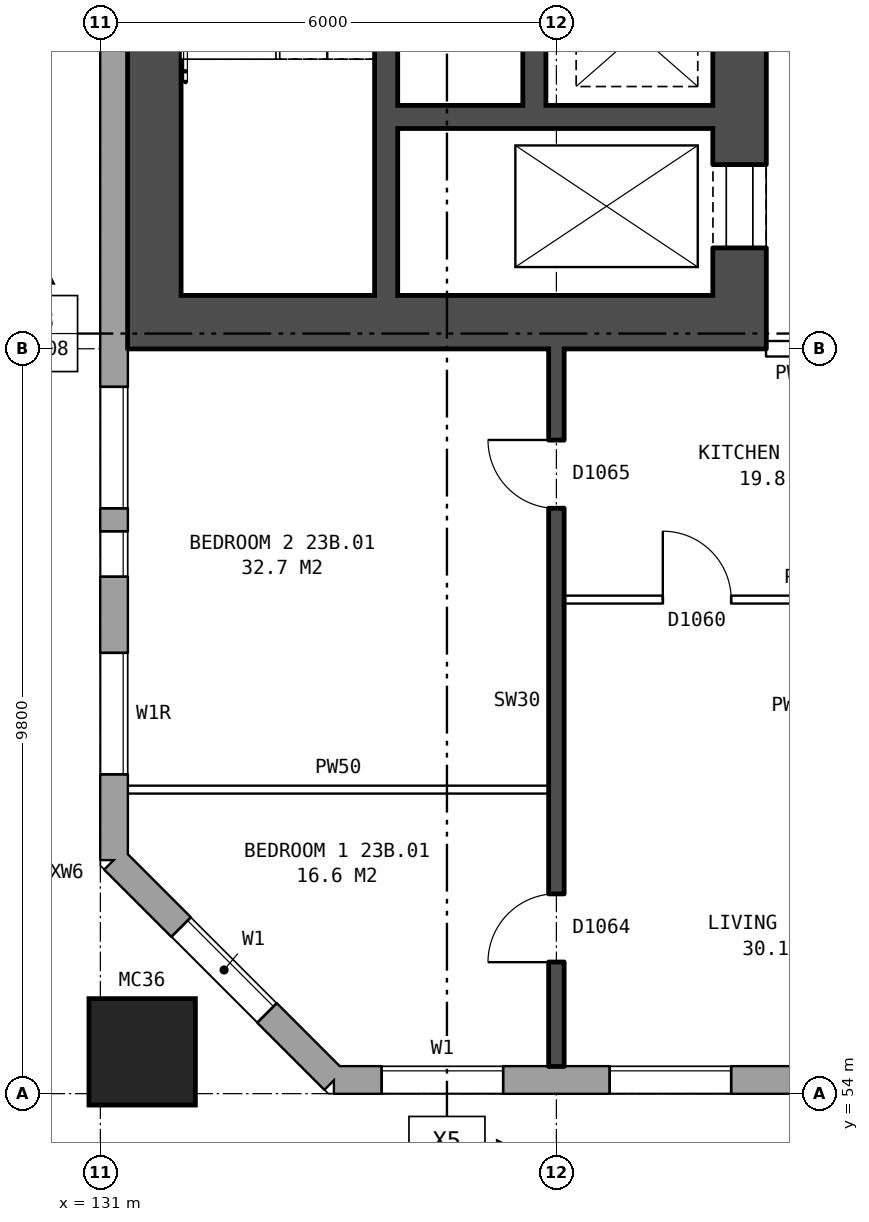
"""IFC4 building model, lengths in metres.
Left out: names, types, materials, properties, quantities, classifications, styles, units other than length and angle.
Written with IfcOpenShell. Run it as: python <this file> out.ifc"""

import sys

from ifc_helpers import new_model, si_unit, direction, frame, frame_2d, origin, origin_2d, place, context, subcontext, project, spatial, rectangle, hollow_rectangle, extrude, element, fill, save


model = new_model("IFC4")
c1 = context("Model", 3, precision=1e-05, world=origin(), true_north=direction((0.0, 1.0)))
c2 = subcontext(c1, "Body", "Model", "MODEL_VIEW")
j1 = project(units=[si_unit("LENGTHUNIT", "METRE"), si_unit("PLANEANGLEUNIT", "RADIAN")], contexts=[c1])
p1 = place(None, origin())
s1 = spatial("IfcSite", under=j1, at=p1, CompositionType="ELEMENT")
p2 = place(p1, origin())
s2 = spatial("IfcBuilding", under=s1, at=p2, CompositionType="ELEMENT")
p3 = place(p2, frame((0.0, 0.0, 84.0)))
s3 = spatial("IfcBuildingStorey", under=s2, at=p3, CompositionType="ELEMENT", Elevation=84.0)
p4 = place(p3, frame((131.55, 54.55, 0.0), z_axis=(0.0, 0.0, 1.0), x_axis=(1.0, 0.0, 0.0)))
e1 = element("IfcColumn", 1, at=p4, inside=s3, PredefinedType="COLUMN", context=c2, shape_type="SweptSolid", body=[
    extrude(hollow_rectangle(XDim=1.4, YDim=1.4, WallThickness=0.075, at=origin_2d()), origin(), (0.0, 0.0, 1.0), 3.1),
])
p5 = place(p3, frame((131.18, 57.075, 0.0), z_axis=(0.0, 0.0, 1.0), x_axis=(0.707106781187, -0.707106781187, 0.0)))
e2 = element("IfcWall", 2, at=p5, inside=s3, PredefinedType="STANDARD", context=c2, shape_type="SweptSolid", body=[
    extrude(rectangle(XDim=4.094, YDim=0.36, at=frame_2d((2.047, 0.0))), origin(), (0.0, 0.0, 1.0), 2.85),
])
p6 = place(p5, frame((1.247, 0.0, 0.8)))
e3 = element("IfcOpeningElement", 3, at=p6, cuts=e2, PredefinedType="OPENING", context=c2, shape_type="SweptSolid", body=[
    extrude(rectangle(XDim=1.6, YDim=1.8, at=frame_2d((0.8, 0.9))), frame((0.0, 0.19, 0.0), z_axis=(0.0, -1.0, 0.0), x_axis=(1.0, 0.0, 0.0)), (0.0, 0.0, 1.0), 0.38),
])
p7 = place(p3, frame((134.075, 54.18, 0.0), z_axis=(0.0, 0.0, 1.0), x_axis=(1.0, 0.0, 0.0)))
e4 = element("IfcWall", 4, at=p7, inside=s3, PredefinedType="STANDARD", context=c2, shape_type="SweptSolid", body=[
    extrude(rectangle(XDim=38.101, YDim=0.36, at=frame_2d((19.05, 0.0))), origin(), (0.0, 0.0, 1.0), 2.85),
])
p8 = place(p7, frame((0.625, 0.0, 0.8)))
e5 = element("IfcOpeningElement", 5, at=p8, cuts=e4, PredefinedType="OPENING", context=c2, shape_type="SweptSolid", body=[
    extrude(rectangle(XDim=1.6, YDim=1.8, at=frame_2d((0.8, 0.9))), frame((0.0, 0.19, 0.0), z_axis=(0.0, -1.0, 0.0), x_axis=(1.0, 0.0, 0.0)), (0.0, 0.0, 1.0), 0.38),
])
p9 = place(p7, frame((3.625, 0.0, 0.8)))
e6 = element("IfcOpeningElement", 6, at=p9, cuts=e4, PredefinedType="OPENING", context=c2, shape_type="SweptSolid", body=[
    extrude(rectangle(XDim=1.6, YDim=1.8, at=frame_2d((0.8, 0.9))), frame((0.0, 0.19, 0.0), z_axis=(0.0, -1.0, 0.0), x_axis=(1.0, 0.0, 0.0)), (0.0, 0.0, 1.0), 0.38),
])
p10 = place(p7, frame((6.625, 0.0, 0.8)))
e7 = element("IfcOpeningElement", 7, at=p10, cuts=e4, PredefinedType="OPENING", context=c2, shape_type="SweptSolid", body=[
    extrude(rectangle(XDim=1.6, YDim=1.8, at=frame_2d((0.8, 0.9))), frame((0.0, 0.19, 0.0), z_axis=(0.0, -1.0, 0.0), x_axis=(1.0, 0.0, 0.0)), (0.0, 0.0, 1.0), 0.38),
])
p11 = place(p7, frame((9.625, 0.0, 0.8)))
e8 = element("IfcOpeningElement", 8, at=p11, cuts=e4, PredefinedType="OPENING", context=c2, shape_type="SweptSolid", body=[
    extrude(rectangle(XDim=1.6, YDim=1.8, at=frame_2d((0.8, 0.9))), frame((0.0, 0.19, 0.0), z_axis=(0.0, -1.0, 0.0), x_axis=(1.0, 0.0, 0.0)), (0.0, 0.0, 1.0), 0.38),
])
p12 = place(p7, frame((12.075, 0.0, 0.8)))
e9 = element("IfcOpeningElement", 9, at=p12, cuts=e4, PredefinedType="OPENING", context=c2, shape_type="SweptSolid", body=[
    extrude(rectangle(XDim=1.4, YDim=1.8, at=frame_2d((0.7, 0.9))), frame((0.0, 0.19, 0.0), z_axis=(0.0, -1.0, 0.0), x_axis=(1.0, 0.0, 0.0)), (0.0, 0.0, 1.0), 0.38),
])
p13 = place(p7, frame((15.475, 0.0, 0.65)))
e10 = element("IfcOpeningElement", 10, at=p13, cuts=e4, PredefinedType="OPENING", context=c2, shape_type="SweptSolid", body=[
    extrude(rectangle(XDim=0.6, YDim=0.9, at=frame_2d((0.3, 0.45))), frame((0.0, 0.19, 0.0), z_axis=(0.0, -1.0, 0.0), x_axis=(1.0, 0.0, 0.0)), (0.0, 0.0, 1.0), 0.38),
])
p14 = place(p7, frame((18.625, 0.0, 0.8)))
e11 = element("IfcOpeningElement", 11, at=p14, cuts=e4, PredefinedType="OPENING", context=c2, shape_type="SweptSolid", body=[
    extrude(rectangle(XDim=1.6, YDim=1.8, at=frame_2d((0.8, 0.9))), frame((0.0, 0.19, 0.0), z_axis=(0.0, -1.0, 0.0), x_axis=(1.0, 0.0, 0.0)), (0.0, 0.0, 1.0), 0.38),
])
p15 = place(p7, frame((21.125, 0.0, 0.8)))
e12 = element("IfcOpeningElement", 12, at=p15, cuts=e4, PredefinedType="OPENING", context=c2, shape_type="SweptSolid", body=[
    extrude(rectangle(XDim=1.0, YDim=1.2, at=frame_2d((0.5, 0.6))), frame((0.0, 0.19, 0.0), z_axis=(0.0, -1.0, 0.0), x_axis=(1.0, 0.0, 0.0)), (0.0, 0.0, 1.0), 0.38),
])
p16 = place(p7, frame((24.625, 0.0, 0.8)))
e13 = element("IfcOpeningElement", 13, at=p16, cuts=e4, PredefinedType="OPENING", context=c2, shape_type="SweptSolid", body=[
    extrude(rectangle(XDim=1.6, YDim=1.8, at=frame_2d((0.8, 0.9))), frame((0.0, 0.19, 0.0), z_axis=(0.0, -1.0, 0.0), x_axis=(1.0, 0.0, 0.0)), (0.0, 0.0, 1.0), 0.38),
])
p17 = place(p7, frame((27.625, 0.0, 0.8)))
e14 = element("IfcOpeningElement", 14, at=p17, cuts=e4, PredefinedType="OPENING", context=c2, shape_type="SweptSolid", body=[
    extrude(rectangle(XDim=1.6, YDim=1.8, at=frame_2d((0.8, 0.9))), frame((0.0, 0.19, 0.0), z_axis=(0.0, -1.0, 0.0), x_axis=(1.0, 0.0, 0.0)), (0.0, 0.0, 1.0), 0.38),
])
p18 = place(p7, frame((30.625, 0.0, 0.8)))
e15 = element("IfcOpeningElement", 15, at=p18, cuts=e4, PredefinedType="OPENING", context=c2, shape_type="SweptSolid", body=[
    extrude(rectangle(XDim=1.6, YDim=1.8, at=frame_2d((0.8, 0.9))), frame((0.0, 0.19, 0.0), z_axis=(0.0, -1.0, 0.0), x_axis=(1.0, 0.0, 0.0)), (0.0, 0.0, 1.0), 0.38),
])
p19 = place(p7, frame((33.625, 0.0, 0.8)))
e16 = element("IfcOpeningElement", 16, at=p19, cuts=e4, PredefinedType="OPENING", context=c2, shape_type="SweptSolid", body=[
    extrude(rectangle(XDim=1.6, YDim=1.8, at=frame_2d((0.8, 0.9))), frame((0.0, 0.19, 0.0), z_axis=(0.0, -1.0, 0.0), x_axis=(1.0, 0.0, 0.0)), (0.0, 0.0, 1.0), 0.38),
])
p20 = place(p7, frame((13.775, 0.0, 1.6)))
e17 = element("IfcOpeningElement", 17, at=p20, cuts=e4, PredefinedType="OPENING", context=c2, shape_type="SweptSolid", body=[
    extrude(rectangle(XDim=0.6, YDim=0.9, at=frame_2d((0.3, 0.45))), frame((0.0, 0.19, 0.0), z_axis=(0.0, -1.0, 0.0), x_axis=(1.0, 0.0, 0.0)), (0.0, 0.0, 1.0), 0.38),
])
p21 = place(p7, frame((16.375, 0.0, 0.65)))
e18 = element("IfcOpeningElement", 18, at=p21, cuts=e4, PredefinedType="OPENING", context=c2, shape_type="SweptSolid", body=[
    extrude(rectangle(XDim=1.4, YDim=1.8, at=frame_2d((0.7, 0.9))), frame((0.0, 0.19, 0.0), z_axis=(0.0, -1.0, 0.0), x_axis=(1.0, 0.0, 0.0)), (0.0, 0.0, 1.0), 0.38),
])
p22 = place(p7, frame((23.625, 0.0, 1.7)))
e19 = element("IfcOpeningElement", 19, at=p22, cuts=e4, PredefinedType="OPENING", context=c2, shape_type="SweptSolid", body=[
    extrude(rectangle(XDim=0.6, YDim=0.9, at=frame_2d((0.3, 0.45))), frame((0.0, 0.19, 0.0), z_axis=(0.0, -1.0, 0.0), x_axis=(1.0, 0.0, 0.0)), (0.0, 0.0, 1.0), 0.38),
])
p23 = place(p3, frame((131.18, 82.925, 0.0), z_axis=(0.0, 0.0, 1.0), x_axis=(0.0, -1.0, 0.0)))
e20 = element("IfcWall", 20, at=p23, inside=s3, PredefinedType="STANDARD", context=c2, shape_type="SweptSolid", body=[
    extrude(rectangle(XDim=25.851, YDim=0.36, at=frame_2d((12.925, 0.0))), origin(), (0.0, 0.0, 1.0), 2.85),
])
p24 = place(p23, frame((1.075, 0.0, 0.8)))
e21 = element("IfcOpeningElement", 21, at=p24, cuts=e20, PredefinedType="OPENING", context=c2, shape_type="SweptSolid", body=[
    extrude(rectangle(XDim=1.2, YDim=1.2, at=frame_2d((0.6, 0.6))), frame((0.0, 0.19, 0.0), z_axis=(0.0, -1.0, 0.0), x_axis=(1.0, 0.0, 0.0)), (0.0, 0.0, 1.0), 0.38),
])
p25 = place(p23, frame((4.625, 0.0, 0.8)))
e22 = element("IfcOpeningElement", 22, at=p25, cuts=e20, PredefinedType="OPENING", context=c2, shape_type="SweptSolid", body=[
    extrude(rectangle(XDim=1.6, YDim=1.8, at=frame_2d((0.8, 0.9))), frame((0.0, 0.19, 0.0), z_axis=(0.0, -1.0, 0.0), x_axis=(1.0, 0.0, 0.0)), (0.0, 0.0, 1.0), 0.38),
])
p26 = place(p23, frame((19.625, 0.0, 0.8)))
e23 = element("IfcOpeningElement", 23, at=p26, cuts=e20, PredefinedType="OPENING", context=c2, shape_type="SweptSolid", body=[
    extrude(rectangle(XDim=1.6, YDim=1.8, at=frame_2d((0.8, 0.9))), frame((0.0, 0.19, 0.0), z_axis=(0.0, -1.0, 0.0), x_axis=(1.0, 0.0, 0.0)), (0.0, 0.0, 1.0), 0.38),
])
p27 = place(p23, frame((21.525, 0.0, 1.7)))
e24 = element("IfcOpeningElement", 24, at=p27, cuts=e20, PredefinedType="OPENING", context=c2, shape_type="SweptSolid", body=[
    extrude(rectangle(XDim=0.6, YDim=0.9, at=frame_2d((0.3, 0.45))), frame((0.0, 0.19, 0.0), z_axis=(0.0, -1.0, 0.0), x_axis=(1.0, 0.0, 0.0)), (0.0, 0.0, 1.0), 0.38),
])
p28 = place(p23, frame((3.725, 0.0, 1.7)))
e25 = element("IfcOpeningElement", 25, at=p28, cuts=e20, PredefinedType="OPENING", context=c2, shape_type="SweptSolid", body=[
    extrude(rectangle(XDim=0.6, YDim=0.9, at=frame_2d((0.3, 0.45))), frame((0.0, 0.19, 0.0), z_axis=(0.0, -1.0, 0.0), x_axis=(1.0, 0.0, 0.0)), (0.0, 0.0, 1.0), 0.38),
])
p29 = place(p23, frame((23.125, 0.0, 0.8)))
e26 = element("IfcOpeningElement", 26, at=p29, cuts=e20, PredefinedType="OPENING", context=c2, shape_type="SweptSolid", body=[
    extrude(rectangle(XDim=1.6, YDim=0.9, at=frame_2d((0.8, 0.45))), frame((0.0, 0.19, 0.0), z_axis=(0.0, -1.0, 0.0), x_axis=(1.0, 0.0, 0.0)), (0.0, 0.0, 1.0), 0.38),
])
p30 = place(p3, frame((139.41, 64.5, 0.0), z_axis=(0.0, 0.0, 1.0), x_axis=(0.0, 1.0, 0.0)))
e27 = element("IfcWall", 27, at=p30, inside=s3, PredefinedType="SHEAR", context=c2, shape_type="SweptSolid", body=[
    extrude(rectangle(XDim=11.0, YDim=0.7, at=frame_2d((5.5, 0.0))), origin(), (0.0, 0.0, 1.0), 2.85),
])
p31 = place(p30, frame((0.625, 0.0, 0.0)))
e28 = element("IfcOpeningElement", 28, at=p31, cuts=e27, PredefinedType="OPENING", context=c2, shape_type="SweptSolid", body=[
    extrude(rectangle(XDim=1.1, YDim=2.1, at=frame_2d((0.55, 1.05))), frame((0.0, 0.36, 0.0), z_axis=(0.0, -1.0, 0.0), x_axis=(1.0, 0.0, 0.0)), (0.0, 0.0, 1.0), 0.72),
])
p32 = place(p30, frame((9.2, 0.0, 0.0)))
e29 = element("IfcOpeningElement", 29, at=p32, cuts=e27, PredefinedType="OPENING", context=c2, shape_type="SweptSolid", body=[
    extrude(rectangle(XDim=1.1, YDim=2.1, at=frame_2d((0.55, 1.05))), frame((0.0, 0.36, 0.0), z_axis=(0.0, -1.0, 0.0), x_axis=(1.0, 0.0, 0.0)), (0.0, 0.0, 1.0), 0.72),
])
p33 = place(p30, frame((7.425, 0.0, 0.0)))
e30 = element("IfcOpeningElement", 30, at=p33, cuts=e27, PredefinedType="OPENING", context=c2, shape_type="SweptSolid", body=[
    extrude(rectangle(XDim=0.85, YDim=2.1, at=frame_2d((0.425, 1.05))), frame((0.0, 0.36, 0.0), z_axis=(0.0, -1.0, 0.0), x_axis=(1.0, 0.0, 0.0)), (0.0, 0.0, 1.0), 0.72),
])
p34 = place(p3, frame((131.71, 64.5, 0.0), z_axis=(0.0, 0.0, 1.0), x_axis=(0.0, 1.0, 0.0)))
e31 = element("IfcWall", 31, at=p34, inside=s3, PredefinedType="SHEAR", context=c2, shape_type="SweptSolid", body=[
    extrude(rectangle(XDim=11.0, YDim=0.7, at=frame_2d((5.5, 0.0))), origin(), (0.0, 0.0, 1.0), 2.85),
])
p35 = place(p3, frame((139.76, 64.15, 0.0), z_axis=(0.0, 0.0, 1.0), x_axis=(-1.0, 0.0, 0.0)))
e32 = element("IfcWall", 32, at=p35, inside=s3, PredefinedType="SHEAR", context=c2, shape_type="SweptSolid", body=[
    extrude(rectangle(XDim=8.4, YDim=0.7, at=frame_2d((4.2, 0.0))), origin(), (0.0, 0.0, 1.0), 2.85),
])
p36 = place(p3, frame((139.06, 66.85, 0.0), z_axis=(0.0, 0.0, 1.0), x_axis=(-1.0, 0.0, 0.0)))
e33 = element("IfcWall", 33, at=p36, inside=s3, PredefinedType="SHEAR", context=c2, shape_type="SweptSolid", body=[
    extrude(rectangle(XDim=4.15, YDim=0.3, at=frame_2d((2.075, 0.0))), origin(), (0.0, 0.0, 1.0), 2.85),
])
p37 = place(p3, frame((136.71, 67.0, 0.0), z_axis=(0.0, 0.0, 1.0), x_axis=(0.0, 1.0, 0.0)))
e34 = element("IfcWall", 34, at=p37, inside=s3, PredefinedType="SHEAR", context=c2, shape_type="SweptSolid", body=[
    extrude(rectangle(XDim=4.1, YDim=0.3, at=frame_2d((2.05, 0.0))), origin(), (0.0, 0.0, 1.0), 2.85),
])
p38 = place(p3, frame((134.76, 64.5, 0.0), z_axis=(0.0, 0.0, 1.0), x_axis=(0.0, 1.0, 0.0)))
e35 = element("IfcWall", 35, at=p38, inside=s3, PredefinedType="SHEAR", context=c2, shape_type="SweptSolid", body=[
    extrude(rectangle(XDim=6.6, YDim=0.3, at=frame_2d((3.3, 0.0))), origin(), (0.0, 0.0, 1.0), 2.85),
])
p39 = place(p3, frame((131.36, 58.0, 0.0), z_axis=(0.0, 0.0, 1.0), x_axis=(1.0, 0.0, 0.0)))
e36 = element("IfcWall", 36, at=p39, inside=s3, PredefinedType="PARTITIONING", context=c2, shape_type="SweptSolid", body=[
    extrude(rectangle(XDim=5.54, YDim=0.1, at=frame_2d((2.77, 0.0))), origin(), (0.0, 0.0, 1.0), 2.85),
])
p40 = place(p3, frame((137.1, 60.5, 0.0), z_axis=(0.0, 0.0, 1.0), x_axis=(1.0, 0.0, 0.0)))
e37 = element("IfcWall", 37, at=p40, inside=s3, PredefinedType="PARTITIONING", context=c2, shape_type="SweptSolid", body=[
    extrude(rectangle(XDim=5.8, YDim=0.1, at=frame_2d((2.9, 0.0))), origin(), (0.0, 0.0, 1.0), 2.85),
])
p41 = place(p40, frame((1.3, 0.0, 0.0)))
e38 = element("IfcOpeningElement", 38, at=p41, cuts=e37, PredefinedType="OPENING", context=c2, shape_type="SweptSolid", body=[
    extrude(rectangle(XDim=0.9, YDim=2.1, at=frame_2d((0.45, 1.05))), frame((0.0, 0.06, 0.0), z_axis=(0.0, -1.0, 0.0), x_axis=(1.0, 0.0, 0.0)), (0.0, 0.0, 1.0), 0.12),
])
p42 = place(p40, frame((4.2, 0.0, 0.0)))
e39 = element("IfcOpeningElement", 39, at=p42, cuts=e37, PredefinedType="OPENING", context=c2, shape_type="SweptSolid", body=[
    extrude(rectangle(XDim=0.9, YDim=2.1, at=frame_2d((0.45, 1.05))), frame((0.0, 0.06, 0.0), z_axis=(0.0, -1.0, 0.0), x_axis=(1.0, 0.0, 0.0)), (0.0, 0.0, 1.0), 0.12),
])
p43 = place(p3, frame((139.76, 63.8, 0.0), z_axis=(0.0, 0.0, 1.0), x_axis=(1.0, 0.0, 0.0)))
e40 = element("IfcWall", 40, at=p43, inside=s3, PredefinedType="PARTITIONING", context=c2, shape_type="SweptSolid", body=[
    extrude(rectangle(XDim=3.0, YDim=0.2, at=frame_2d((1.5, 0.0))), origin(), (0.0, 0.0, 1.0), 2.85),
])
p44 = place(p43, frame((1.0, 0.0, 0.0)))
e41 = element("IfcOpeningElement", 41, at=p44, cuts=e40, PredefinedType="OPENING", context=c2, shape_type="SweptSolid", body=[
    extrude(rectangle(XDim=1.0, YDim=2.1, at=frame_2d((0.5, 1.05))), frame((0.0, 0.11, 0.0), z_axis=(0.0, -1.0, 0.0), x_axis=(1.0, 0.0, 0.0)), (0.0, 0.0, 1.0), 0.22),
])
p45 = place(p3, frame((137.0, 54.36, 0.0), z_axis=(0.0, 0.0, 1.0), x_axis=(0.0, 1.0, 0.0)))
e42 = element("IfcWall", 42, at=p45, inside=s3, PredefinedType="SOLIDWALL", context=c2, shape_type="SweptSolid", body=[
    extrude(rectangle(XDim=9.44, YDim=0.2, at=frame_2d((4.72, 0.0))), origin(), (0.0, 0.0, 1.0), 2.85),
])
p46 = place(p45, frame((1.37, 0.0, 0.0)))
e43 = element("IfcOpeningElement", 43, at=p46, cuts=e42, PredefinedType="OPENING", context=c2, shape_type="SweptSolid", body=[
    extrude(rectangle(XDim=0.9, YDim=2.1, at=frame_2d((0.45, 1.05))), frame((0.0, 0.11, 0.0), z_axis=(0.0, -1.0, 0.0), x_axis=(1.0, 0.0, 0.0)), (0.0, 0.0, 1.0), 0.22),
])
p47 = place(p45, frame((7.34, 0.0, 0.0)))
e44 = element("IfcOpeningElement", 44, at=p47, cuts=e42, PredefinedType="OPENING", context=c2, shape_type="SweptSolid", body=[
    extrude(rectangle(XDim=0.9, YDim=2.1, at=frame_2d((0.45, 1.05))), frame((0.0, 0.11, 0.0), z_axis=(0.0, -1.0, 0.0), x_axis=(1.0, 0.0, 0.0)), (0.0, 0.0, 1.0), 0.22),
])
p48 = place(p6, origin())
e45 = element("IfcWindow", 45, at=p48, inside=s3, PartitioningType="SINGLE_PANEL", PredefinedType="WINDOW", context=c2, shape_type="SweptSolid", body=[
    extrude(rectangle(XDim=1.6, YDim=1.8, at=frame_2d((0.8, 0.9))), frame((0.0, 0.15, 0.0), z_axis=(0.0, -1.0, 0.0), x_axis=(1.0, 0.0, 0.0)), (0.0, 0.0, 1.0), 0.06),
])
fill(e3, e45)
p49 = place(p8, origin())
e46 = element("IfcWindow", 46, at=p49, inside=s3, PartitioningType="SINGLE_PANEL", PredefinedType="WINDOW", context=c2, shape_type="SweptSolid", body=[
    extrude(rectangle(XDim=1.6, YDim=1.8, at=frame_2d((0.8, 0.9))), frame((0.0, 0.15, 0.0), z_axis=(0.0, -1.0, 0.0), x_axis=(1.0, 0.0, 0.0)), (0.0, 0.0, 1.0), 0.06),
])
fill(e5, e46)
p50 = place(p9, origin())
e47 = element("IfcWindow", 47, at=p50, inside=s3, PartitioningType="SINGLE_PANEL", PredefinedType="WINDOW", context=c2, shape_type="SweptSolid", body=[
    extrude(rectangle(XDim=1.6, YDim=1.8, at=frame_2d((0.8, 0.9))), frame((0.0, 0.15, 0.0), z_axis=(0.0, -1.0, 0.0), x_axis=(1.0, 0.0, 0.0)), (0.0, 0.0, 1.0), 0.06),
])
fill(e6, e47)
p51 = place(p26, origin())
e48 = element("IfcWindow", 48, at=p51, inside=s3, PartitioningType="SINGLE_PANEL", PredefinedType="WINDOW", context=c2, shape_type="SweptSolid", body=[
    extrude(rectangle(XDim=1.6, YDim=1.8, at=frame_2d((0.8, 0.9))), frame((0.0, 0.15, 0.0), z_axis=(0.0, -1.0, 0.0), x_axis=(1.0, 0.0, 0.0)), (0.0, 0.0, 1.0), 0.06),
])
fill(e23, e48)
p52 = place(p27, origin())
e49 = element("IfcWindow", 49, at=p52, inside=s3, PartitioningType="SINGLE_PANEL", PredefinedType="WINDOW", context=c2, shape_type="SweptSolid", body=[
    extrude(rectangle(XDim=0.6, YDim=0.9, at=frame_2d((0.3, 0.45))), frame((0.0, 0.15, 0.0), z_axis=(0.0, -1.0, 0.0), x_axis=(1.0, 0.0, 0.0)), (0.0, 0.0, 1.0), 0.06),
])
fill(e24, e49)
p53 = place(p31, origin())
e50 = element("IfcDoor", 50, at=p53, inside=s3, OperationType="DOUBLE_DOOR_SLIDING", PredefinedType="DOOR", context=c2, shape_type="SweptSolid", body=[
    extrude(rectangle(XDim=1.1, YDim=2.1, at=frame_2d((0.55, 1.05))), frame((0.0, 0.335, 0.0), z_axis=(0.0, -1.0, 0.0), x_axis=(1.0, 0.0, 0.0)), (0.0, 0.0, 1.0), 0.05),
])
fill(e28, e50)
p54 = place(p46, origin())
e51 = element("IfcDoor", 51, at=p54, inside=s3, OperationType="SINGLE_SWING_LEFT", PredefinedType="DOOR", context=c2, shape_type="SweptSolid", body=[
    extrude(rectangle(XDim=0.9, YDim=2.1, at=frame_2d((0.45, 1.05))), frame((0.0, 0.025, 0.0), z_axis=(0.0, -1.0, 0.0), x_axis=(1.0, 0.0, 0.0)), (0.0, 0.0, 1.0), 0.05),
])
fill(e43, e51)
p55 = place(p47, origin())
e52 = element("IfcDoor", 52, at=p55, inside=s3, OperationType="SINGLE_SWING_RIGHT", PredefinedType="DOOR", context=c2, shape_type="SweptSolid", body=[
    extrude(rectangle(XDim=0.9, YDim=2.1, at=frame_2d((0.45, 1.05))), frame((0.0, 0.025, 0.0), z_axis=(0.0, -1.0, 0.0), x_axis=(1.0, 0.0, 0.0)), (0.0, 0.0, 1.0), 0.05),
])
fill(e44, e52)
p56 = place(p41, origin())
e53 = element("IfcDoor", 53, at=p56, inside=s3, OperationType="SINGLE_SWING_LEFT", PredefinedType="DOOR", context=c2, shape_type="SweptSolid", body=[
    extrude(rectangle(XDim=0.9, YDim=2.1, at=frame_2d((0.45, 1.05))), frame((0.0, 0.025, 0.0), z_axis=(0.0, -1.0, 0.0), x_axis=(1.0, 0.0, 0.0)), (0.0, 0.0, 1.0), 0.05),
])
fill(e38, e53)
p57 = place(p29, origin())
e54 = element("IfcWindow", 54, at=p57, inside=s3, PartitioningType="SINGLE_PANEL", PredefinedType="WINDOW", context=c2, shape_type="SweptSolid", body=[
    extrude(rectangle(XDim=1.6, YDim=0.9, at=frame_2d((0.8, 0.45))), frame((0.0, 0.15, 0.0), z_axis=(0.0, -1.0, 0.0), x_axis=(1.0, 0.0, 0.0)), (0.0, 0.0, 1.0), 0.06),
])
fill(e26, e54)
save(model, sys.argv[1])
